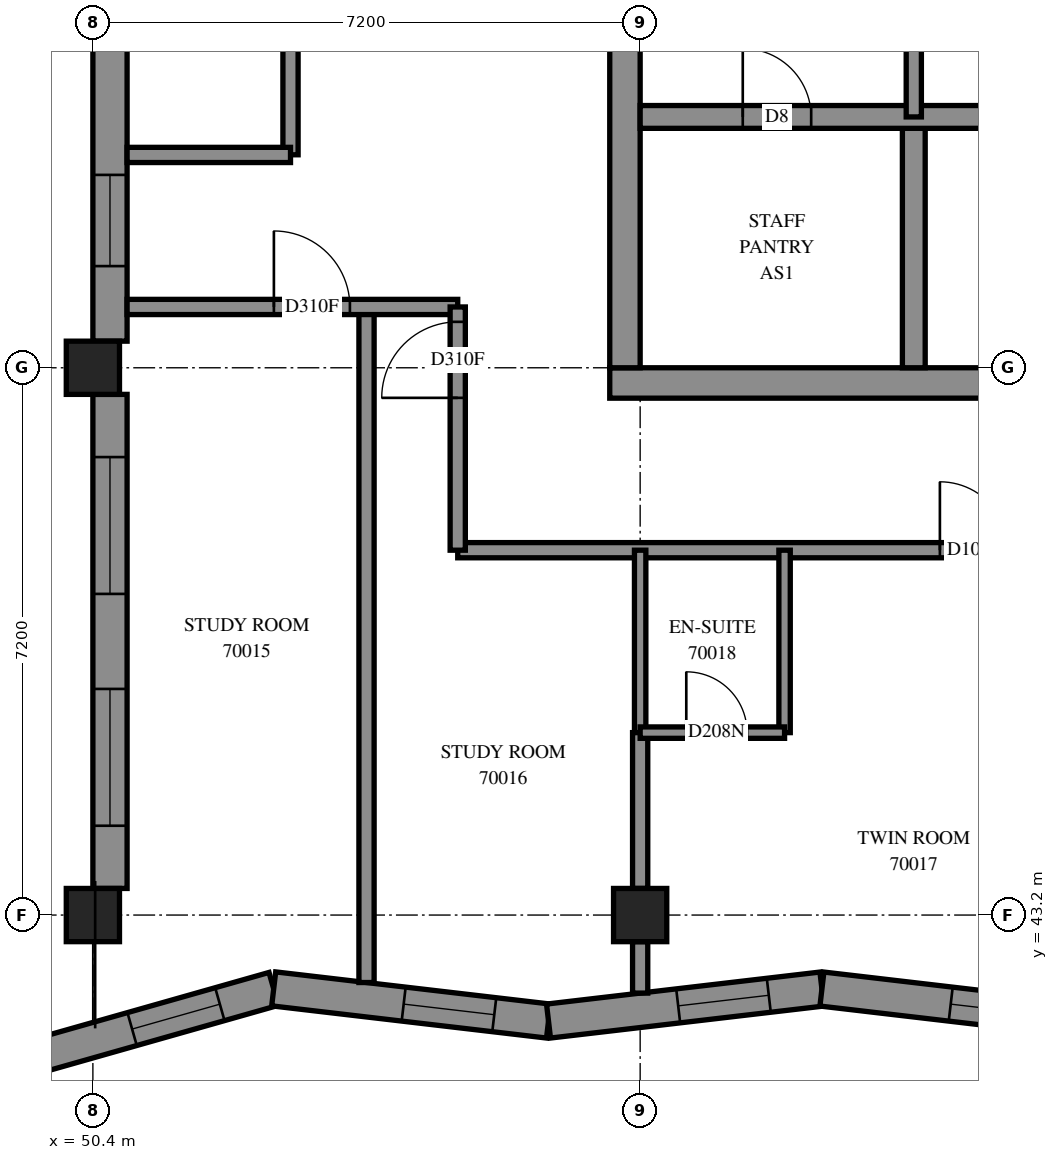
"""IFC4 building model, lengths in metres.
Left out: names, types, materials, properties, quantities, classifications, styles, units other than length and angle.
Written with IfcOpenShell. Run it as: python <this file> out.ifc"""

import sys

from ifc_helpers import new_model, si_unit, direction, frame, frame_2d, origin, origin_2d, place, context, subcontext, project, spatial, polyline, rectangle, outline, extrude, element, fill, save


model = new_model("IFC4")
c1 = context("Model", 3, precision=1e-05, world=origin(), true_north=direction((0.0, 1.0)))
c2 = subcontext(c1, "Body", "Model", "MODEL_VIEW")
j1 = project(units=[si_unit("LENGTHUNIT", "METRE"), si_unit("PLANEANGLEUNIT", "RADIAN")], contexts=[c1])
p1 = place(None, origin())
s1 = spatial("IfcSite", under=j1, at=p1, CompositionType="ELEMENT")
p2 = place(p1, origin())
s2 = spatial("IfcBuilding", under=s1, at=p2, CompositionType="ELEMENT")
p3 = place(p2, frame((0.0, 0.0, 257.4)))
s3 = spatial("IfcBuildingStorey", under=s2, at=p3, CompositionType="ELEMENT", Elevation=257.4)
for number, where, z_axis, x_axis in (
    (1, (50.4, 43.2, 0.0), (0.0, 0.0, 1.0), (1.0, 0.0, 0.0)),
    (2, (50.4, 50.4, 0.0), (0.0, 0.0, 1.0), (1.0, 0.0, 0.0)),
    (3, (57.6, 43.2, 0.0), (0.0, 0.0, 1.0), (1.0, 0.0, 0.0)),
):
    element("IfcColumn", number, at=place(p3, frame(where, z_axis=z_axis, x_axis=x_axis)), inside=s3, PredefinedType="COLUMN", context=c2, shape_type="SweptSolid", body=[
        extrude(rectangle(XDim=0.7, YDim=0.7, at=origin_2d()), origin(), (0.0, 0.0, 1.0), 3.1),
    ])
p4 = place(p3, frame((57.2, 50.2, -0.3), z_axis=(0.0, 0.0, 1.0), x_axis=(1.0, 0.0, 0.0)))
e4 = element("IfcWall", 4, at=p4, inside=s3, PredefinedType="SHEAR", context=c2, shape_type="SweptSolid", body=[
    extrude(rectangle(XDim=15.2, YDim=0.4, at=frame_2d((7.6, 0.0))), origin(), (0.0, 0.0, 1.0), 2.7),
])
p5 = place(p3, frame((57.4, 50.4, -0.3), z_axis=(0.0, 0.0, 1.0), x_axis=(0.0, 1.0, 0.0)))
e5 = element("IfcWall", 5, at=p5, inside=s3, PredefinedType="SHEAR", context=c2, shape_type="SweptSolid", body=[
    extrude(rectangle(XDim=14.4, YDim=0.4, at=frame_2d((7.2, 0.0))), origin(), (0.0, 0.0, 1.0), 2.7),
])
p6 = place(p5, frame((4.55, 0.0, 0.3)))
e6 = element("IfcOpeningElement", 6, at=p6, cuts=e5, PredefinedType="OPENING", context=c2, shape_type="SweptSolid", body=[
    extrude(rectangle(XDim=1.1, YDim=2.1, at=frame_2d((0.55, 1.05))), frame((0.0, 0.21, 0.0), z_axis=(0.0, -1.0, 0.0), x_axis=(1.0, 0.0, 0.0)), (0.0, 0.0, 1.0), 0.42),
])
p7 = place(p5, frame((11.35, 0.0, 0.3)))
e7 = element("IfcOpeningElement", 7, at=p7, cuts=e5, PredefinedType="OPENING", context=c2, shape_type="SweptSolid", body=[
    extrude(rectangle(XDim=1.1, YDim=2.1, at=frame_2d((0.55, 1.05))), frame((0.0, 0.21, 0.0), z_axis=(0.0, -1.0, 0.0), x_axis=(1.0, 0.0, 0.0)), (0.0, 0.0, 1.0), 0.42),
])
p8 = place(p3, frame((61.2, 50.4, 0.0), z_axis=(0.0, 0.0, 1.0), x_axis=(0.0, 1.0, 0.0)))
e8 = element("IfcWall", 8, at=p8, inside=s3, PredefinedType="SOLIDWALL", context=c2, shape_type="SweptSolid", body=[
    extrude(rectangle(XDim=3.3, YDim=0.3, at=frame_2d((1.65, 0.0))), origin(), (0.0, 0.0, 1.0), 3.1),
])
p9 = place(p3, frame((57.6, 53.7, 0.0), z_axis=(0.0, 0.0, 1.0), x_axis=(1.0, 0.0, 0.0)))
e9 = element("IfcWall", 9, at=p9, inside=s3, PredefinedType="SOLIDWALL", context=c2, shape_type="SweptSolid", body=[
    extrude(rectangle(XDim=14.4, YDim=0.3, at=frame_2d((7.2, 0.0))), origin(), (0.0, 0.0, 1.0), 3.1),
])
p10 = place(p9, frame((1.35, 0.0, 0.0)))
e10 = element("IfcOpeningElement", 10, at=p10, cuts=e9, PredefinedType="OPENING", context=c2, shape_type="SweptSolid", body=[
    extrude(rectangle(XDim=0.9, YDim=2.1, at=frame_2d((0.45, 1.05))), frame((0.0, 0.16, 0.0), z_axis=(0.0, -1.0, 0.0), x_axis=(1.0, 0.0, 0.0)), (0.0, 0.0, 1.0), 0.32),
])
p11 = place(p9, frame((4.95, 0.0, 0.0)))
e11 = element("IfcOpeningElement", 11, at=p11, cuts=e9, PredefinedType="OPENING", context=c2, shape_type="SweptSolid", body=[
    extrude(rectangle(XDim=0.9, YDim=2.1, at=frame_2d((0.45, 1.05))), frame((0.0, 0.16, 0.0), z_axis=(0.0, -1.0, 0.0), x_axis=(1.0, 0.0, 0.0)), (0.0, 0.0, 1.0), 0.32),
])
p12 = place(p9, frame((8.55, 0.0, 0.0)))
e12 = element("IfcOpeningElement", 12, at=p12, cuts=e9, PredefinedType="OPENING", context=c2, shape_type="SweptSolid", body=[
    extrude(rectangle(XDim=0.9, YDim=2.1, at=frame_2d((0.45, 1.05))), frame((0.0, 0.16, 0.0), z_axis=(0.0, -1.0, 0.0), x_axis=(1.0, 0.0, 0.0)), (0.0, 0.0, 1.0), 0.32),
])
p13 = place(p9, frame((12.05, 0.0, 0.0)))
e13 = element("IfcOpeningElement", 13, at=p13, cuts=e9, PredefinedType="OPENING", context=c2, shape_type="SweptSolid", body=[
    extrude(rectangle(XDim=1.1, YDim=2.1, at=frame_2d((0.55, 1.05))), frame((0.0, 0.16, 0.0), z_axis=(0.0, -1.0, 0.0), x_axis=(1.0, 0.0, 0.0)), (0.0, 0.0, 1.0), 0.32),
])
p14 = place(p3, frame((49.425, 41.277, 0.0), z_axis=(0.0, 0.0, 1.0), x_axis=(0.9620019919, 0.2730424283, 0.0)))
e14 = element("IfcWall", 14, at=p14, inside=s3, PredefinedType="SOLIDWALL", context=c2, shape_type="SweptSolid", body=[
    extrude(outline(polyline([(-0.298, -0.225), (3.442, -0.225), (3.531, 0.225), (0.298, 0.225), (-0.298, -0.225)])), origin(), (0.0, 0.0, 1.0), 3.1),
])
p15 = place(p14, frame((1.55, 0.0, 0.45)))
e15 = element("IfcOpeningElement", 15, at=p15, cuts=e14, PredefinedType="OPENING", context=c2, shape_type="SweptSolid", body=[
    extrude(rectangle(XDim=1.2, YDim=2.55, at=frame_2d((0.6, 1.275))), frame((0.0, 0.235, 0.0), z_axis=(0.0, -1.0, 0.0), x_axis=(1.0, 0.0, 0.0)), (0.0, 0.0, 1.0), 0.47),
])
p16 = place(p3, frame((52.779, 42.229, 0.0), z_axis=(0.0, 0.0, 1.0), x_axis=(0.9932186927, -0.1162610363, 0.0)))
e16 = element("IfcWall", 16, at=p16, inside=s3, PredefinedType="SOLIDWALL", context=c2, shape_type="SweptSolid", body=[
    extrude(outline(polyline([(0.045, -0.225), (3.667, -0.225), (3.614, 0.225), (-0.045, 0.225), (0.045, -0.225)])), origin(), (0.0, 0.0, 1.0), 3.1),
])
p17 = place(p16, frame((1.722, 0.0, 0.45)))
e17 = element("IfcOpeningElement", 17, at=p17, cuts=e16, PredefinedType="OPENING", context=c2, shape_type="SweptSolid", body=[
    extrude(rectangle(XDim=1.2, YDim=2.55, at=frame_2d((0.6, 1.275))), frame((0.0, 0.235, 0.0), z_axis=(0.0, -1.0, 0.0), x_axis=(1.0, 0.0, 0.0)), (0.0, 0.0, 1.0), 0.47),
])
p18 = place(p3, frame((56.394, 41.806, 0.0), z_axis=(0.0, 0.0, 1.0), x_axis=(0.9932205385, 0.1162452661, 0.0)))
e18 = element("IfcWall", 18, at=p18, inside=s3, PredefinedType="SOLIDWALL", context=c2, shape_type="SweptSolid", body=[
    extrude(outline(polyline([(-0.026, -0.225), (3.595, -0.225), (3.648, 0.225), (0.026, 0.225), (-0.026, -0.225)])), origin(), (0.0, 0.0, 1.0), 3.1),
])
p19 = place(p18, frame((1.718, 0.0, 0.45)))
e19 = element("IfcOpeningElement", 19, at=p19, cuts=e18, PredefinedType="OPENING", context=c2, shape_type="SweptSolid", body=[
    extrude(rectangle(XDim=1.2, YDim=2.55, at=frame_2d((0.6, 1.275))), frame((0.0, 0.235, 0.0), z_axis=(0.0, -1.0, 0.0), x_axis=(1.0, 0.0, 0.0)), (0.0, 0.0, 1.0), 0.47),
])
p20 = place(p3, frame((59.991, 42.227, 0.0), z_axis=(0.0, 0.0, 1.0), x_axis=(0.9932209116, -0.1162420782, 0.0)))
e20 = element("IfcWall", 20, at=p20, inside=s3, PredefinedType="SOLIDWALL", context=c2, shape_type="SweptSolid", body=[
    extrude(outline(polyline([(0.026, -0.225), (3.648, -0.225), (3.595, 0.225), (-0.026, 0.225), (0.026, -0.225)])), origin(), (0.0, 0.0, 1.0), 3.1),
])
p21 = place(p20, frame((1.706, 0.0, 0.45)))
e21 = element("IfcOpeningElement", 21, at=p21, cuts=e20, PredefinedType="OPENING", context=c2, shape_type="SweptSolid", body=[
    extrude(rectangle(XDim=1.2, YDim=2.55, at=frame_2d((0.6, 1.275))), frame((0.0, 0.235, 0.0), z_axis=(0.0, -1.0, 0.0), x_axis=(1.0, 0.0, 0.0)), (0.0, 0.0, 1.0), 0.47),
])
p22 = place(p3, frame((50.625, 57.25, 0.0), z_axis=(0.0, 0.0, 1.0), x_axis=(0.0, -1.0, 0.0)))
e22 = element("IfcWall", 22, at=p22, inside=s3, PredefinedType="SOLIDWALL", context=c2, shape_type="SweptSolid", body=[
    extrude(rectangle(XDim=6.5, YDim=0.45, at=frame_2d((3.25, 0.0))), origin(), (0.0, 0.0, 1.0), 3.1),
])
p23 = place(p22, frame((0.825, 0.0, 0.7)))
e23 = element("IfcOpeningElement", 23, at=p23, cuts=e22, PredefinedType="OPENING", context=c2, shape_type="SweptSolid", body=[
    extrude(rectangle(XDim=1.8, YDim=1.8, at=frame_2d((0.9, 0.9))), frame((0.0, 0.235, 0.0), z_axis=(0.0, -1.0, 0.0), x_axis=(1.0, 0.0, 0.0)), (0.0, 0.0, 1.0), 0.47),
])
p24 = place(p22, frame((4.312, 0.0, 0.6)))
e24 = element("IfcOpeningElement", 24, at=p24, cuts=e22, PredefinedType="OPENING", context=c2, shape_type="SweptSolid", body=[
    extrude(rectangle(XDim=1.2, YDim=1.9, at=frame_2d((0.6, 0.95))), frame((0.0, 0.235, 0.0), z_axis=(0.0, -1.0, 0.0), x_axis=(1.0, 0.0, 0.0)), (0.0, 0.0, 1.0), 0.47),
])
p25 = place(p3, frame((50.625, 50.05, 0.0), z_axis=(0.0, 0.0, 1.0), x_axis=(0.0, -1.0, 0.0)))
e25 = element("IfcWall", 25, at=p25, inside=s3, PredefinedType="SOLIDWALL", context=c2, shape_type="SweptSolid", body=[
    extrude(rectangle(XDim=6.5, YDim=0.45, at=frame_2d((3.25, 0.0))), origin(), (0.0, 0.0, 1.0), 3.1),
])
p26 = place(p25, frame((0.825, 0.0, 0.7)))
e26 = element("IfcOpeningElement", 26, at=p26, cuts=e25, PredefinedType="OPENING", context=c2, shape_type="SweptSolid", body=[
    extrude(rectangle(XDim=1.8, YDim=1.8, at=frame_2d((0.9, 0.9))), frame((0.0, 0.235, 0.0), z_axis=(0.0, -1.0, 0.0), x_axis=(1.0, 0.0, 0.0)), (0.0, 0.0, 1.0), 0.47),
])
p27 = place(p25, frame((3.875, 0.0, 0.7)))
e27 = element("IfcOpeningElement", 27, at=p27, cuts=e25, PredefinedType="OPENING", context=c2, shape_type="SweptSolid", body=[
    extrude(rectangle(XDim=1.8, YDim=1.8, at=frame_2d((0.9, 0.9))), frame((0.0, 0.235, 0.0), z_axis=(0.0, -1.0, 0.0), x_axis=(1.0, 0.0, 0.0)), (0.0, 0.0, 1.0), 0.47),
])
p28 = place(p3, frame((61.2, 53.7, 0.0), z_axis=(0.0, 0.0, 1.0), x_axis=(0.0, 1.0, 0.0)))
e28 = element("IfcWall", 28, at=p28, inside=s3, PredefinedType="PARTITIONING", context=c2, shape_type="SweptSolid", body=[
    extrude(rectangle(XDim=3.6, YDim=0.2, at=frame_2d((1.8, 0.0))), origin(), (0.0, 0.0, 1.0), 3.1),
])
p29 = place(p3, frame((55.2, 48.0, 0.0), z_axis=(0.0, 0.0, 1.0), x_axis=(1.0, 0.0, 0.0)))
e29 = element("IfcWall", 29, at=p29, inside=s3, PredefinedType="PARTITIONING", context=c2, shape_type="SweptSolid", body=[
    extrude(rectangle(XDim=19.15, YDim=0.2, at=frame_2d((9.575, 0.0))), origin(), (0.0, 0.0, 1.0), 3.1),
])
p30 = place(p29, frame((6.343, 0.0, 0.0)))
e30 = element("IfcOpeningElement", 30, at=p30, cuts=e29, PredefinedType="OPENING", context=c2, shape_type="SweptSolid", body=[
    extrude(rectangle(XDim=0.9, YDim=2.1, at=frame_2d((0.45, 1.05))), frame((0.0, 0.11, 0.0), z_axis=(0.0, -1.0, 0.0), x_axis=(1.0, 0.0, 0.0)), (0.0, 0.0, 1.0), 0.22),
])
p31 = place(p29, frame((11.633, 0.0, 0.0)))
e31 = element("IfcOpeningElement", 31, at=p31, cuts=e29, PredefinedType="OPENING", context=c2, shape_type="SweptSolid", body=[
    extrude(rectangle(XDim=1.0, YDim=2.1, at=frame_2d((0.5, 1.05))), frame((0.0, 0.11, 0.0), z_axis=(0.0, -1.0, 0.0), x_axis=(1.0, 0.0, 0.0)), (0.0, 0.0, 1.0), 0.22),
])
p32 = place(p29, frame((13.707, 0.0, 0.0)))
e32 = element("IfcOpeningElement", 32, at=p32, cuts=e29, PredefinedType="OPENING", context=c2, shape_type="SweptSolid", body=[
    extrude(rectangle(XDim=1.0, YDim=2.1, at=frame_2d((0.5, 1.05))), frame((0.0, 0.11, 0.0), z_axis=(0.0, -1.0, 0.0), x_axis=(1.0, 0.0, 0.0)), (0.0, 0.0, 1.0), 0.22),
])
p33 = place(p3, frame((54.0, 42.312, 0.0), z_axis=(0.0, 0.0, 1.0), x_axis=(0.0, 1.0, 0.0)))
e33 = element("IfcWall", 33, at=p33, inside=s3, PredefinedType="PARTITIONING", context=c2, shape_type="SweptSolid", body=[
    extrude(rectangle(XDim=8.888, YDim=0.2, at=frame_2d((4.444, 0.0))), origin(), (0.0, 0.0, 1.0), 3.1),
])
p34 = place(p3, frame((53.0, 53.202, 0.0), z_axis=(0.0, 0.0, 1.0), x_axis=(0.0, 1.0, 0.0)))
e34 = element("IfcWall", 34, at=p34, inside=s3, PredefinedType="PARTITIONING", context=c2, shape_type="SweptSolid", body=[
    extrude(rectangle(XDim=5.198, YDim=0.2, at=frame_2d((2.599, 0.0))), origin(), (0.0, 0.0, 1.0), 3.1),
])
p35 = place(p3, frame((50.85, 51.2, 0.0), z_axis=(0.0, 0.0, 1.0), x_axis=(1.0, 0.0, 0.0)))
e35 = element("IfcWall", 35, at=p35, inside=s3, PredefinedType="PARTITIONING", context=c2, shape_type="SweptSolid", body=[
    extrude(rectangle(XDim=4.35, YDim=0.2, at=frame_2d((2.175, 0.0))), origin(), (0.0, 0.0, 1.0), 3.1),
])
p36 = place(p35, frame((1.931, 0.0, 0.0)))
e36 = element("IfcOpeningElement", 36, at=p36, cuts=e35, PredefinedType="OPENING", context=c2, shape_type="SweptSolid", body=[
    extrude(rectangle(XDim=1.0, YDim=2.1, at=frame_2d((0.5, 1.05))), frame((0.0, 0.11, 0.0), z_axis=(0.0, -1.0, 0.0), x_axis=(1.0, 0.0, 0.0)), (0.0, 0.0, 1.0), 0.22),
])
p37 = place(p3, frame((55.2, 48.0, 0.0), z_axis=(0.0, 0.0, 1.0), x_axis=(0.0, 1.0, 0.0)))
e37 = element("IfcWall", 37, at=p37, inside=s3, PredefinedType="PARTITIONING", context=c2, shape_type="SweptSolid", body=[
    extrude(rectangle(XDim=3.2, YDim=0.2, at=frame_2d((1.6, 0.0))), origin(), (0.0, 0.0, 1.0), 3.1),
])
p38 = place(p37, frame((2.004, 0.0, 0.0)))
e38 = element("IfcOpeningElement", 38, at=p38, cuts=e37, PredefinedType="OPENING", context=c2, shape_type="SweptSolid", body=[
    extrude(rectangle(XDim=1.0, YDim=2.1, at=frame_2d((0.5, 1.05))), frame((0.0, 0.11, 0.0), z_axis=(0.0, -1.0, 0.0), x_axis=(1.0, 0.0, 0.0)), (0.0, 0.0, 1.0), 0.22),
])
for number, where, z_axis, x_axis in (
    (39, (59.5, 45.6, 0.0), (0.0, 0.0, 1.0), (0.0, 1.0, 0.0)),
    (40, (57.6, 45.6, 0.0), (0.0, 0.0, 1.0), (0.0, 1.0, 0.0)),
):
    element("IfcWall", number, at=place(p3, frame(where, z_axis=z_axis, x_axis=x_axis)), inside=s3, PredefinedType="PARTITIONING", context=c2, shape_type="SweptSolid", body=[
        extrude(rectangle(XDim=2.4, YDim=0.15, at=frame_2d((1.2, 0.0))), origin(), (0.0, 0.0, 1.0), 3.1),
    ])
p39 = place(p3, frame((50.85, 53.2, 0.0), z_axis=(0.0, 0.0, 1.0), x_axis=(1.0, 0.0, 0.0)))
e41 = element("IfcWall", 41, at=p39, inside=s3, PredefinedType="PARTITIONING", context=c2, shape_type="SweptSolid", body=[
    extrude(rectangle(XDim=2.15, YDim=0.2, at=frame_2d((1.075, 0.0))), origin(), (0.0, 0.0, 1.0), 3.1),
])
p40 = place(p3, frame((57.6, 43.55, 0.0), z_axis=(0.0, 0.0, 1.0), x_axis=(0.0, 1.0, 0.0)))
e42 = element("IfcWall", 42, at=p40, inside=s3, PredefinedType="PARTITIONING", context=c2, shape_type="SweptSolid", body=[
    extrude(rectangle(XDim=2.05, YDim=0.2, at=frame_2d((1.025, 0.0))), origin(), (0.0, 0.0, 1.0), 3.1),
])
p41 = place(p3, frame((57.6, 45.6, 0.0), z_axis=(0.0, 0.0, 1.0), x_axis=(1.0, 0.0, 0.0)))
e43 = element("IfcWall", 43, at=p41, inside=s3, PredefinedType="PARTITIONING", context=c2, shape_type="SweptSolid", body=[
    extrude(rectangle(XDim=1.9, YDim=0.15, at=frame_2d((0.95, 0.0))), origin(), (0.0, 0.0, 1.0), 3.1),
])
p42 = place(p41, frame((0.607, 0.0, 0.0)))
e44 = element("IfcOpeningElement", 44, at=p42, cuts=e43, PredefinedType="OPENING", context=c2, shape_type="SweptSolid", body=[
    extrude(rectangle(XDim=0.8, YDim=2.1, at=frame_2d((0.4, 1.05))), frame((0.0, 0.085, 0.0), z_axis=(0.0, -1.0, 0.0), x_axis=(1.0, 0.0, 0.0)), (0.0, 0.0, 1.0), 0.17),
])
p43 = place(p3, frame((57.6, 42.173, 0.0), z_axis=(0.0, 0.0, 1.0), x_axis=(0.0, 1.0, 0.0)))
e45 = element("IfcWall", 45, at=p43, inside=s3, PredefinedType="PARTITIONING", context=c2, shape_type="SweptSolid", body=[
    extrude(rectangle(XDim=0.677, YDim=0.2, at=frame_2d((0.338, 0.0))), origin(), (0.0, 0.0, 1.0), 3.1),
])
p44 = place(p15, origin())
e46 = element("IfcWindow", 46, at=p44, inside=s3, PartitioningType="SINGLE_PANEL", PredefinedType="WINDOW", context=c2, shape_type="SweptSolid", body=[
    extrude(rectangle(XDim=1.2, YDim=2.55, at=frame_2d((0.6, 1.275))), frame((0.0, 0.205, 0.0), z_axis=(0.0, -1.0, 0.0), x_axis=(1.0, 0.0, 0.0)), (0.0, 0.0, 1.0), 0.06),
])
fill(e15, e46)
p45 = place(p17, origin())
e47 = element("IfcWindow", 47, at=p45, inside=s3, PartitioningType="SINGLE_PANEL", PredefinedType="WINDOW", context=c2, shape_type="SweptSolid", body=[
    extrude(rectangle(XDim=1.2, YDim=2.55, at=frame_2d((0.6, 1.275))), frame((0.0, 0.205, 0.0), z_axis=(0.0, -1.0, 0.0), x_axis=(1.0, 0.0, 0.0)), (0.0, 0.0, 1.0), 0.06),
])
fill(e17, e47)
p46 = place(p19, origin())
e48 = element("IfcWindow", 48, at=p46, inside=s3, PartitioningType="SINGLE_PANEL", PredefinedType="WINDOW", context=c2, shape_type="SweptSolid", body=[
    extrude(rectangle(XDim=1.2, YDim=2.55, at=frame_2d((0.6, 1.275))), frame((0.0, 0.205, 0.0), z_axis=(0.0, -1.0, 0.0), x_axis=(1.0, 0.0, 0.0)), (0.0, 0.0, 1.0), 0.06),
])
fill(e19, e48)
p47 = place(p21, origin())
e49 = element("IfcWindow", 49, at=p47, inside=s3, PartitioningType="SINGLE_PANEL", PredefinedType="WINDOW", context=c2, shape_type="SweptSolid", body=[
    extrude(rectangle(XDim=1.2, YDim=2.55, at=frame_2d((0.6, 1.275))), frame((0.0, 0.205, 0.0), z_axis=(0.0, -1.0, 0.0), x_axis=(1.0, 0.0, 0.0)), (0.0, 0.0, 1.0), 0.06),
])
fill(e21, e49)
p48 = place(p26, origin())
e50 = element("IfcWindow", 50, at=p48, inside=s3, PartitioningType="SINGLE_PANEL", PredefinedType="WINDOW", context=c2, shape_type="SweptSolid", body=[
    extrude(rectangle(XDim=1.8, YDim=1.8, at=frame_2d((0.9, 0.9))), frame((0.0, 0.205, 0.0), z_axis=(0.0, -1.0, 0.0), x_axis=(1.0, 0.0, 0.0)), (0.0, 0.0, 1.0), 0.06),
])
fill(e26, e50)
p49 = place(p27, origin())
e51 = element("IfcWindow", 51, at=p49, inside=s3, PartitioningType="SINGLE_PANEL", PredefinedType="WINDOW", context=c2, shape_type="SweptSolid", body=[
    extrude(rectangle(XDim=1.8, YDim=1.8, at=frame_2d((0.9, 0.9))), frame((0.0, 0.205, 0.0), z_axis=(0.0, -1.0, 0.0), x_axis=(1.0, 0.0, 0.0)), (0.0, 0.0, 1.0), 0.06),
])
fill(e27, e51)
p50 = place(p10, origin())
e52 = element("IfcDoor", 52, at=p50, inside=s3, OperationType="SINGLE_SWING_LEFT", PredefinedType="DOOR", context=c2, shape_type="SweptSolid", body=[
    extrude(rectangle(XDim=0.9, YDim=2.1, at=frame_2d((0.45, 1.05))), frame((0.0, 0.025, 0.0), z_axis=(0.0, -1.0, 0.0), x_axis=(1.0, 0.0, 0.0)), (0.0, 0.0, 1.0), 0.05),
])
fill(e10, e52)
p51 = place(p36, origin())
e53 = element("IfcDoor", 53, at=p51, inside=s3, OperationType="SINGLE_SWING_LEFT", PredefinedType="DOOR", context=c2, shape_type="SweptSolid", body=[
    extrude(rectangle(XDim=1.0, YDim=2.1, at=frame_2d((0.5, 1.05))), frame((0.0, 0.025, 0.0), z_axis=(0.0, -1.0, 0.0), x_axis=(1.0, 0.0, 0.0)), (0.0, 0.0, 1.0), 0.05),
])
fill(e36, e53)
p52 = place(p38, origin())
e54 = element("IfcDoor", 54, at=p52, inside=s3, OperationType="SINGLE_SWING_RIGHT", PredefinedType="DOOR", context=c2, shape_type="SweptSolid", body=[
    extrude(rectangle(XDim=1.0, YDim=2.1, at=frame_2d((0.5, 1.05))), frame((0.0, 0.025, 0.0), z_axis=(0.0, -1.0, 0.0), x_axis=(1.0, 0.0, 0.0)), (0.0, 0.0, 1.0), 0.05),
])
fill(e38, e54)
p53 = place(p30, origin())
e55 = element("IfcDoor", 55, at=p53, inside=s3, OperationType="SINGLE_SWING_LEFT", PredefinedType="DOOR", context=c2, shape_type="SweptSolid", body=[
    extrude(rectangle(XDim=0.9, YDim=2.1, at=frame_2d((0.45, 1.05))), frame((0.0, 0.025, 0.0), z_axis=(0.0, -1.0, 0.0), x_axis=(1.0, 0.0, 0.0)), (0.0, 0.0, 1.0), 0.05),
])
fill(e30, e55)
p54 = place(p42, origin())
e56 = element("IfcDoor", 56, at=p54, inside=s3, OperationType="SINGLE_SWING_RIGHT", PredefinedType="DOOR", context=c2, shape_type="SweptSolid", body=[
    extrude(rectangle(XDim=0.8, YDim=2.1, at=frame_2d((0.4, 1.05))), frame((0.0, 0.025, 0.0), z_axis=(0.0, -1.0, 0.0), x_axis=(1.0, 0.0, 0.0)), (0.0, 0.0, 1.0), 0.05),
])
fill(e44, e56)
p55 = place(p24, origin())
e57 = element("IfcWindow", 57, at=p55, inside=s3, PartitioningType="SINGLE_PANEL", PredefinedType="WINDOW", context=c2, shape_type="SweptSolid", body=[
    extrude(rectangle(XDim=1.2, YDim=1.9, at=frame_2d((0.6, 0.95))), frame((0.0, 0.205, 0.0), z_axis=(0.0, -1.0, 0.0), x_axis=(1.0, 0.0, 0.0)), (0.0, 0.0, 1.0), 0.06),
])
fill(e24, e57)
save(model, sys.argv[1])
